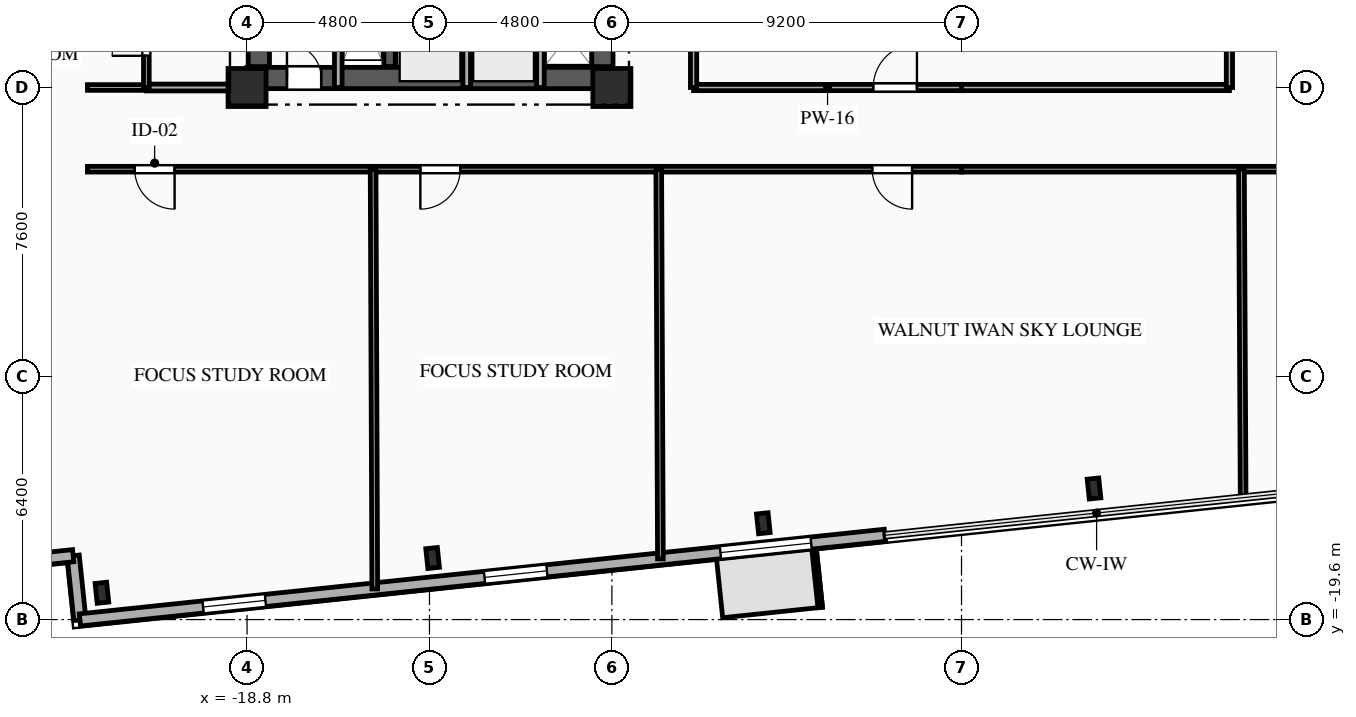
"""IFC4 building model, lengths in metres.
Left out: names, types, materials, properties, quantities, classifications, styles, units other than length and angle.
Written with IfcOpenShell. Run it as: python <this file> out.ifc"""

import sys

from ifc_helpers import new_model, si_unit, direction, frame, frame_2d, origin, origin_2d, place, context, subcontext, project, spatial, rectangle, i_section, extrude, element, fill, save


model = new_model("IFC4")
c1 = context("Model", 3, precision=1e-05, world=origin(), true_north=direction((0.0, 1.0)))
c2 = subcontext(c1, "Body", "Model", "MODEL_VIEW")
j1 = project(units=[si_unit("LENGTHUNIT", "METRE"), si_unit("PLANEANGLEUNIT", "RADIAN")], contexts=[c1])
p1 = place(None, origin())
s1 = spatial("IfcSite", under=j1, at=p1, CompositionType="ELEMENT")
p2 = place(p1, origin())
s2 = spatial("IfcBuilding", under=s1, at=p2, CompositionType="ELEMENT")
p3 = place(p2, frame((0.0, 0.0, 102.45)))
s3 = spatial("IfcBuildingStorey", under=s2, at=p3, CompositionType="ELEMENT", Elevation=102.45)
for number, where, z_axis, x_axis in (
    (1, (-18.8, -5.6, 0.0), (0.0, 0.0, 1.0), (1.0, 0.0, 0.0)),
    (2, (-9.2, -5.6, 0.0), (0.0, 0.0, 1.0), (1.0, 0.0, 0.0)),
):
    element("IfcColumn", number, at=place(p3, frame(where, z_axis=z_axis, x_axis=x_axis)), inside=s3, PredefinedType="COLUMN", context=c2, shape_type="SweptSolid", body=[
        extrude(rectangle(XDim=1.0, YDim=1.0, at=origin_2d()), origin(), (0.0, 0.0, 1.0), 3.35),
    ])
for number, where, z_axis, x_axis in (
    (3, (-22.619, -18.895, 0.0), (0.0, 0.0, 1.0), (0.995, 0.105, 0.0)),
    (4, (-13.917, -17.98, 0.0), (0.0, 0.0, 1.0), (0.995, 0.105, 0.0)),
    (5, (-5.215, -17.066, 0.0), (0.0, 0.0, 1.0), (0.995, 0.105, 0.0)),
    (6, (3.487, -16.151, 0.0), (0.0, 0.0, 1.0), (0.995, 0.105, 0.0)),
):
    element("IfcColumn", number, at=place(p3, frame(where, z_axis=z_axis, x_axis=x_axis)), inside=s3, PredefinedType="COLUMN", context=c2, shape_type="SweptSolid", body=[
        extrude(i_section(OverallWidth=0.306, OverallDepth=0.524, WebThickness=0.021, FlangeThickness=0.04, FilletRadius=0.027, at=origin_2d()), origin(), (0.0, 0.0, 1.0), 3.35),
    ])
for number, where, z_axis, x_axis in (
    (7, (-23.198, -19.609, 0.0), (0.0, 0.0, 1.0), (-0.105, 0.995, 0.0)),
    (8, (-23.376, -17.919, 0.0), (0.0, 0.0, 1.0), (-0.995, -0.105, 0.0)),
):
    element("IfcWall", number, at=place(p3, frame(where, z_axis=z_axis, x_axis=x_axis)), inside=s3, PredefinedType="SOLIDWALL", context=c2, shape_type="SweptSolid", body=[
        extrude(rectangle(XDim=1.7, YDim=0.32, at=frame_2d((0.85, 0.0))), origin(), (0.0, 0.0, 1.0), 3.045),
    ])
p4 = place(p3, frame((-2.015, -17.383, 0.0), z_axis=(0.0, 0.0, 1.0), x_axis=(-0.994521393935, -0.104533233979, 0.0)))
e9 = element("IfcWall", 9, at=p4, inside=s3, PredefinedType="SOLIDWALL", context=c2, shape_type="SweptSolid", body=[
    extrude(rectangle(XDim=21.3, YDim=0.32, at=frame_2d((10.65, 0.0))), origin(), (0.0, 0.0, 1.0), 3.045),
])
p5 = place(p4, frame((1.953, 0.0, 0.85)))
e10 = element("IfcOpeningElement", 10, at=p5, cuts=e9, PredefinedType="OPENING", context=c2, shape_type="SweptSolid", body=[
    extrude(rectangle(XDim=2.4, YDim=1.95, at=frame_2d((1.2, 0.975))), frame((0.0, 0.17, 0.0), z_axis=(0.0, -1.0, 0.0), x_axis=(1.0, 0.0, 0.0)), (0.0, 0.0, 1.0), 0.34),
])
p6 = place(p4, frame((8.944, 0.0, 0.85)))
e11 = element("IfcOpeningElement", 11, at=p6, cuts=e9, PredefinedType="OPENING", context=c2, shape_type="SweptSolid", body=[
    extrude(rectangle(XDim=1.65, YDim=1.85, at=frame_2d((0.825, 0.925))), frame((0.0, 0.17, 0.0), z_axis=(0.0, -1.0, 0.0), x_axis=(1.0, 0.0, 0.0)), (0.0, 0.0, 1.0), 0.34),
])
p7 = place(p4, frame((16.391, 0.0, 0.85)))
e12 = element("IfcOpeningElement", 12, at=p7, cuts=e9, PredefinedType="OPENING", context=c2, shape_type="SweptSolid", body=[
    extrude(rectangle(XDim=1.65, YDim=1.85, at=frame_2d((0.825, 0.925))), frame((0.0, 0.17, 0.0), z_axis=(0.0, -1.0, 0.0), x_axis=(1.0, 0.0, 0.0)), (0.0, 0.0, 1.0), 0.34),
])
p8 = place(p3, frame((-18.8, -5.35, 0.0), z_axis=(0.0, 0.0, 1.0), x_axis=(1.0, 0.0, 0.0)))
e13 = element("IfcWall", 13, at=p8, inside=s3, PredefinedType="SHEAR", context=c2, shape_type="SweptSolid", body=[
    extrude(rectangle(XDim=9.6, YDim=0.56, at=frame_2d((4.8, 0.0))), origin(), (0.0, 0.0, 1.0), 3.045),
])
p9 = place(p8, frame((1.05, 0.0, 0.0)))
e14 = element("IfcOpeningElement", 14, at=p9, cuts=e13, PredefinedType="OPENING", context=c2, shape_type="SweptSolid", body=[
    extrude(rectangle(XDim=0.9, YDim=2.1, at=frame_2d((0.45, 1.05))), frame((0.0, 0.29, 0.0), z_axis=(0.0, -1.0, 0.0), x_axis=(1.0, 0.0, 0.0)), (0.0, 0.0, 1.0), 0.58),
])
p10 = place(p3, frame((-18.49, -5.05, 0.0), z_axis=(0.0, 0.0, 1.0), x_axis=(0.0, 1.0, 0.0)))
e15 = element("IfcWall", 15, at=p10, inside=s3, PredefinedType="SHEAR", context=c2, shape_type="SweptSolid", body=[
    extrude(rectangle(XDim=10.1, YDim=0.56, at=frame_2d((5.05, 0.0))), origin(), (0.0, 0.0, 1.0), 3.045),
])
p11 = place(p3, frame((-9.45, -5.05, 0.0), z_axis=(0.0, 0.0, 1.0), x_axis=(0.0, 1.0, 0.0)))
e16 = element("IfcWall", 16, at=p11, inside=s3, PredefinedType="SHEAR", context=c2, shape_type="SweptSolid", body=[
    extrude(rectangle(XDim=10.1, YDim=0.56, at=frame_2d((5.05, 0.0))), origin(), (0.0, 0.0, 1.0), 3.045),
])
p12 = place(p11, frame((7.175, 0.0, 0.0)))
e17 = element("IfcOpeningElement", 17, at=p12, cuts=e16, PredefinedType="OPENING", context=c2, shape_type="SweptSolid", body=[
    extrude(rectangle(XDim=0.9, YDim=2.1, at=frame_2d((0.45, 1.05))), frame((0.0, 0.29, 0.0), z_axis=(0.0, -1.0, 0.0), x_axis=(1.0, 0.0, 0.0)), (0.0, 0.0, 1.0), 0.58),
])
p13 = place(p11, frame((2.4, 0.0, 0.0)))
e18 = element("IfcOpeningElement", 18, at=p13, cuts=e16, PredefinedType="OPENING", context=c2, shape_type="SweptSolid", body=[
    extrude(rectangle(XDim=1.2, YDim=2.15, at=frame_2d((0.6, 1.075))), frame((0.0, 0.29, 0.0), z_axis=(0.0, -1.0, 0.0), x_axis=(1.0, 0.0, 0.0)), (0.0, 0.0, 1.0), 0.58),
])
p14 = place(p3, frame((-15.05, -5.05, 0.0), z_axis=(0.0, 0.0, 1.0), x_axis=(0.0, 1.0, 0.0)))
e19 = element("IfcWall", 19, at=p14, inside=s3, PredefinedType="SHEAR", context=c2, shape_type="SweptSolid", body=[
    extrude(rectangle(XDim=10.1, YDim=0.3, at=frame_2d((5.05, 0.0))), origin(), (0.0, 0.0, 1.0), 3.045),
])
p15 = place(p3, frame((-16.4, -5.6, 0.0), z_axis=(0.0, 0.0, 1.0), x_axis=(0.0, 1.0, 0.0)))
e20 = element("IfcWall", 20, at=p15, inside=s3, PredefinedType="PARTITIONING", context=c2, shape_type="SweptSolid", body=[
    extrude(rectangle(XDim=3.49, YDim=0.2, at=frame_2d((1.745, 0.0))), origin(), (0.0, 0.0, 1.0), 3.045),
])
for number, where, z_axis, x_axis in (
    (21, (-13.02, -5.6, 0.0), (0.0, 0.0, 1.0), (0.0, 1.0, 0.0)),
    (22, (-11.08, -5.6, 0.0), (0.0, 0.0, 1.0), (0.0, 1.0, 0.0)),
):
    element("IfcWall", number, at=place(p3, frame(where, z_axis=z_axis, x_axis=x_axis)), inside=s3, PredefinedType="PARTITIONING", context=c2, shape_type="SweptSolid", body=[
        extrude(rectangle(XDim=2.25, YDim=0.2, at=frame_2d((1.125, 0.0))), origin(), (0.0, 0.0, 1.0), 3.045),
    ])
p16 = place(p3, frame((-21.45, -5.6, 0.0), z_axis=(0.0, 0.0, 1.0), x_axis=(1.0, 0.0, 0.0)))
e23 = element("IfcWall", 23, at=p16, inside=s3, PredefinedType="PARTITIONING", context=c2, shape_type="SweptSolid", body=[
    extrude(rectangle(XDim=2.65, YDim=0.18, at=frame_2d((1.325, 0.0))), origin(), (0.0, 0.0, 1.0), 3.045),
])
p17 = place(p3, frame((-23.0, -5.6, 0.0), z_axis=(0.0, 0.0, 1.0), x_axis=(1.0, 0.0, 0.0)))
e24 = element("IfcWall", 24, at=p17, inside=s3, PredefinedType="PLUMBINGWALL", context=c2, shape_type="SweptSolid", body=[
    extrude(rectangle(XDim=1.55, YDim=0.15, at=frame_2d((0.775, 0.0))), origin(), (0.0, 0.0, 1.0), 3.045),
])
p18 = place(p3, frame((-15.483, -7.75, 0.0), z_axis=(0.0, 0.0, 1.0), x_axis=(-1.0, 0.0, 0.0)))
e25 = element("IfcWall", 25, at=p18, inside=s3, PredefinedType="PARTITIONING", context=c2, shape_type="SweptSolid", body=[
    extrude(rectangle(XDim=7.517, YDim=0.15, at=frame_2d((3.758, 0.0))), origin(), (0.0, 0.0, 1.0), 3.045),
])
p19 = place(p18, frame((5.223, 0.0, 0.0)))
e26 = element("IfcOpeningElement", 26, at=p19, cuts=e25, PredefinedType="OPENING", context=c2, shape_type="SweptSolid", body=[
    extrude(rectangle(XDim=1.05, YDim=2.15, at=frame_2d((0.525, 1.075))), frame((0.0, 0.085, 0.0), z_axis=(0.0, -1.0, 0.0), x_axis=(1.0, 0.0, 0.0)), (0.0, 0.0, 1.0), 0.17),
])
p20 = place(p3, frame((-7.967, -7.75, 0.0), z_axis=(0.0, 0.0, 1.0), x_axis=(-1.0, 0.0, 0.0)))
e27 = element("IfcWall", 27, at=p20, inside=s3, PredefinedType="PARTITIONING", context=c2, shape_type="SweptSolid", body=[
    extrude(rectangle(XDim=7.516, YDim=0.15, at=frame_2d((3.758, 0.0))), origin(), (0.0, 0.0, 1.0), 3.045),
])
p21 = place(p20, frame((5.223, 0.0, 0.0)))
e28 = element("IfcOpeningElement", 28, at=p21, cuts=e27, PredefinedType="OPENING", context=c2, shape_type="SweptSolid", body=[
    extrude(rectangle(XDim=1.05, YDim=2.15, at=frame_2d((0.525, 1.075))), frame((0.0, 0.085, 0.0), z_axis=(0.0, -1.0, 0.0), x_axis=(1.0, 0.0, 0.0)), (0.0, 0.0, 1.0), 0.17),
])
p22 = place(p3, frame((0.0, -7.75, 0.0), z_axis=(0.0, 0.0, 1.0), x_axis=(-1.0, 0.0, 0.0)))
e29 = element("IfcWall", 29, at=p22, inside=s3, PredefinedType="PARTITIONING", context=c2, shape_type="SweptSolid", body=[
    extrude(rectangle(XDim=7.967, YDim=0.15, at=frame_2d((3.983, 0.0))), origin(), (0.0, 0.0, 1.0), 3.045),
])
p23 = place(p22, frame((1.3, 0.0, 0.0)))
e30 = element("IfcOpeningElement", 30, at=p23, cuts=e29, PredefinedType="OPENING", context=c2, shape_type="SweptSolid", body=[
    extrude(rectangle(XDim=1.05, YDim=2.15, at=frame_2d((0.525, 1.075))), frame((0.0, 0.085, 0.0), z_axis=(0.0, -1.0, 0.0), x_axis=(1.0, 0.0, 0.0)), (0.0, 0.0, 1.0), 0.17),
])
p24 = place(p3, frame((-7.05, -5.6, 0.0), z_axis=(0.0, 0.0, 1.0), x_axis=(1.0, 0.0, 0.0)))
e31 = element("IfcWall", 31, at=p24, inside=s3, PredefinedType="PARTITIONING", context=c2, shape_type="SweptSolid", body=[
    extrude(rectangle(XDim=7.05, YDim=0.165, at=frame_2d((3.525, 0.0))), origin(), (0.0, 0.0, 1.0), 2.53),
])
p25 = place(p24, frame((4.728, 0.0, 0.0)))
e32 = element("IfcOpeningElement", 32, at=p25, cuts=e31, PredefinedType="OPENING", context=c2, shape_type="SweptSolid", body=[
    extrude(rectangle(XDim=1.15, YDim=2.15, at=frame_2d((0.575, 1.075))), frame((0.0, 0.093, 0.0), z_axis=(0.0, -1.0, 0.0), x_axis=(1.0, 0.0, 0.0)), (0.0, 0.0, 1.0), 0.185),
])
p26 = place(p3, frame((7.367, -7.75, 0.0), z_axis=(0.0, 0.0, 1.0), x_axis=(-1.0, 0.0, 0.0)))
e33 = element("IfcWall", 33, at=p26, inside=s3, PredefinedType="PARTITIONING", context=c2, shape_type="SweptSolid", body=[
    extrude(rectangle(XDim=7.367, YDim=0.15, at=frame_2d((3.684, 0.0))), origin(), (0.0, 0.0, 1.0), 3.045),
])
p27 = place(p3, frame((23.0, -7.75, 0.0), z_axis=(0.0, 0.0, 1.0), x_axis=(-1.0, 0.0, 0.0)))
e34 = element("IfcWall", 34, at=p27, inside=s3, PredefinedType="PARTITIONING", context=c2, shape_type="SweptSolid", body=[
    extrude(rectangle(XDim=15.633, YDim=0.15, at=frame_2d((7.816, 0.0))), origin(), (0.0, 0.0, 1.0), 3.045),
])
p28 = place(p27, frame((8.969, 0.0, 0.0)))
e35 = element("IfcOpeningElement", 35, at=p28, cuts=e34, PredefinedType="OPENING", context=c2, shape_type="SweptSolid", body=[
    extrude(rectangle(XDim=1.05, YDim=2.15, at=frame_2d((0.525, 1.075))), frame((0.0, 0.085, 0.0), z_axis=(0.0, -1.0, 0.0), x_axis=(1.0, 0.0, 0.0)), (0.0, 0.0, 1.0), 0.17),
])
p29 = place(p3, frame((0.0, -5.6, 0.0), z_axis=(0.0, 0.0, 1.0), x_axis=(1.0, 0.0, 0.0)))
e36 = element("IfcWall", 36, at=p29, inside=s3, PredefinedType="PARTITIONING", context=c2, shape_type="SweptSolid", body=[
    extrude(rectangle(XDim=7.05, YDim=0.165, at=frame_2d((3.525, 0.0))), origin(), (0.0, 0.0, 1.0), 2.53),
])
for number, where, z_axis, x_axis in (
    (37, (-7.05, 1.45, 0.0), (0.0, 0.0, 1.0), (0.0, -1.0, 0.0)),
    (38, (7.05, -5.6, 0.0), (0.0, 0.0, 1.0), (0.0, 1.0, 0.0)),
):
    element("IfcWall", number, at=place(p3, frame(where, z_axis=z_axis, x_axis=x_axis)), inside=s3, PredefinedType="PARTITIONING", context=c2, shape_type="SweptSolid", body=[
        extrude(rectangle(XDim=7.05, YDim=0.165, at=frame_2d((3.525, 0.0))), origin(), (0.0, 0.0, 1.0), 3.045),
    ])
p30 = place(p3, frame((-21.45, -5.6, 0.0), z_axis=(0.0, 0.0, 1.0), x_axis=(0.0, 1.0, 0.0)))
e39 = element("IfcWall", 39, at=p30, inside=s3, PredefinedType="PLUMBINGWALL", context=c2, shape_type="SweptSolid", body=[
    extrude(rectangle(XDim=2.35, YDim=0.15, at=frame_2d((1.175, 0.0))), origin(), (0.0, 0.0, 1.0), 3.045),
])
p31 = place(p30, frame((0.834, 0.0, 0.0)))
e40 = element("IfcOpeningElement", 40, at=p31, cuts=e39, PredefinedType="OPENING", context=c2, shape_type="SweptSolid", body=[
    extrude(rectangle(XDim=0.9, YDim=2.1, at=frame_2d((0.45, 1.05))), frame((0.0, 0.085, 0.0), z_axis=(0.0, -1.0, 0.0), x_axis=(1.0, 0.0, 0.0)), (0.0, 0.0, 1.0), 0.17),
])
p32 = place(p3, frame((-15.483, -7.75, 0.0), z_axis=(0.0, 0.0, 1.0), x_axis=(0.003956994399, -0.999992171067, 0.0)))
e41 = element("IfcWall", 41, at=p32, inside=s3, PredefinedType="PARTITIONING", context=c2, shape_type="SweptSolid", body=[
    extrude(rectangle(XDim=11.044, YDim=0.15, at=frame_2d((5.522, 0.0))), origin(), (0.0, 0.0, 1.0), 3.045),
])
p33 = place(p3, frame((-7.967, -7.75, 0.0), z_axis=(0.0, 0.0, 1.0), x_axis=(0.004285674928, -0.999990816453, 0.0)))
e42 = element("IfcWall", 42, at=p33, inside=s3, PredefinedType="PARTITIONING", context=c2, shape_type="SweptSolid", body=[
    extrude(rectangle(XDim=10.254, YDim=0.15, at=frame_2d((5.127, 0.0))), origin(), (0.0, 0.0, 1.0), 3.045),
])
p34 = place(p3, frame((7.367, -7.75, 0.0), z_axis=(0.0, 0.0, 1.0), x_axis=(0.005084967311, -0.99998707147, 0.0)))
e43 = element("IfcWall", 43, at=p34, inside=s3, PredefinedType="PARTITIONING", context=c2, shape_type="SweptSolid", body=[
    extrude(rectangle(XDim=8.642, YDim=0.15, at=frame_2d((4.321, 0.0))), origin(), (0.0, 0.0, 1.0), 3.045),
])
p35 = place(p5, origin())
e44 = element("IfcWindow", 44, at=p35, inside=s3, PartitioningType="SINGLE_PANEL", PredefinedType="WINDOW", context=c2, shape_type="SweptSolid", body=[
    extrude(rectangle(XDim=2.4, YDim=1.95, at=frame_2d((1.2, 0.975))), frame((0.0, 0.03, 0.0), z_axis=(0.0, -1.0, 0.0), x_axis=(1.0, 0.0, 0.0)), (0.0, 0.0, 1.0), 0.06),
])
fill(e10, e44)
p36 = place(p6, origin())
e45 = element("IfcWindow", 45, at=p36, inside=s3, PartitioningType="SINGLE_PANEL", PredefinedType="WINDOW", context=c2, shape_type="SweptSolid", body=[
    extrude(rectangle(XDim=1.65, YDim=1.85, at=frame_2d((0.825, 0.925))), frame((0.0, 0.03, 0.0), z_axis=(0.0, -1.0, 0.0), x_axis=(1.0, 0.0, 0.0)), (0.0, 0.0, 1.0), 0.06),
])
fill(e11, e45)
p37 = place(p7, origin())
e46 = element("IfcWindow", 46, at=p37, inside=s3, PartitioningType="SINGLE_PANEL", PredefinedType="WINDOW", context=c2, shape_type="SweptSolid", body=[
    extrude(rectangle(XDim=1.65, YDim=1.85, at=frame_2d((0.825, 0.925))), frame((0.0, 0.03, 0.0), z_axis=(0.0, -1.0, 0.0), x_axis=(1.0, 0.0, 0.0)), (0.0, 0.0, 1.0), 0.06),
])
fill(e12, e46)
p38 = place(p9, origin())
e47 = element("IfcDoor", 47, at=p38, inside=s3, OperationType="SINGLE_SWING_LEFT", PredefinedType="DOOR", context=c2, shape_type="SweptSolid", body=[
    extrude(rectangle(XDim=0.9, YDim=2.1, at=frame_2d((0.45, 1.05))), frame((0.0, 0.025, 0.0), z_axis=(0.0, -1.0, 0.0), x_axis=(1.0, 0.0, 0.0)), (0.0, 0.0, 1.0), 0.05),
])
fill(e14, e47)
p39 = place(p19, origin())
e48 = element("IfcDoor", 48, at=p39, inside=s3, OperationType="SINGLE_SWING_LEFT", PredefinedType="DOOR", context=c2, shape_type="SweptSolid", body=[
    extrude(rectangle(XDim=1.05, YDim=2.15, at=frame_2d((0.525, 1.075))), frame((0.0, 0.025, 0.0), z_axis=(0.0, -1.0, 0.0), x_axis=(1.0, 0.0, 0.0)), (0.0, 0.0, 1.0), 0.05),
])
fill(e26, e48)
p40 = place(p21, origin())
e49 = element("IfcDoor", 49, at=p40, inside=s3, OperationType="SINGLE_SWING_RIGHT", PredefinedType="DOOR", context=c2, shape_type="SweptSolid", body=[
    extrude(rectangle(XDim=1.05, YDim=2.15, at=frame_2d((0.525, 1.075))), frame((0.0, 0.025, 0.0), z_axis=(0.0, -1.0, 0.0), x_axis=(1.0, 0.0, 0.0)), (0.0, 0.0, 1.0), 0.05),
])
fill(e28, e49)
p41 = place(p23, origin())
e50 = element("IfcDoor", 50, at=p41, inside=s3, OperationType="SINGLE_SWING_LEFT", PredefinedType="DOOR", context=c2, shape_type="SweptSolid", body=[
    extrude(rectangle(XDim=1.05, YDim=2.15, at=frame_2d((0.525, 1.075))), frame((0.0, 0.025, 0.0), z_axis=(0.0, -1.0, 0.0), x_axis=(1.0, 0.0, 0.0)), (0.0, 0.0, 1.0), 0.05),
])
fill(e30, e50)
p42 = place(p25, origin())
e51 = element("IfcDoor", 51, at=p42, inside=s3, OperationType="SINGLE_SWING_RIGHT", PredefinedType="DOOR", context=c2, shape_type="SweptSolid", body=[
    extrude(rectangle(XDim=1.15, YDim=2.15, at=frame_2d((0.575, 1.075))), frame((0.0, 0.025, 0.0), z_axis=(0.0, -1.0, 0.0), x_axis=(1.0, 0.0, 0.0)), (0.0, 0.0, 1.0), 0.05),
])
fill(e32, e51)
p43 = place(p31, origin())
e52 = element("IfcDoor", 52, at=p43, inside=s3, OperationType="SINGLE_SWING_LEFT", PredefinedType="DOOR", context=c2, shape_type="SweptSolid", body=[
    extrude(rectangle(XDim=0.9, YDim=2.1, at=frame_2d((0.45, 1.05))), frame((0.0, 0.025, 0.0), z_axis=(0.0, -1.0, 0.0), x_axis=(1.0, 0.0, 0.0)), (0.0, 0.0, 1.0), 0.05),
])
fill(e40, e52)
save(model, sys.argv[1])
